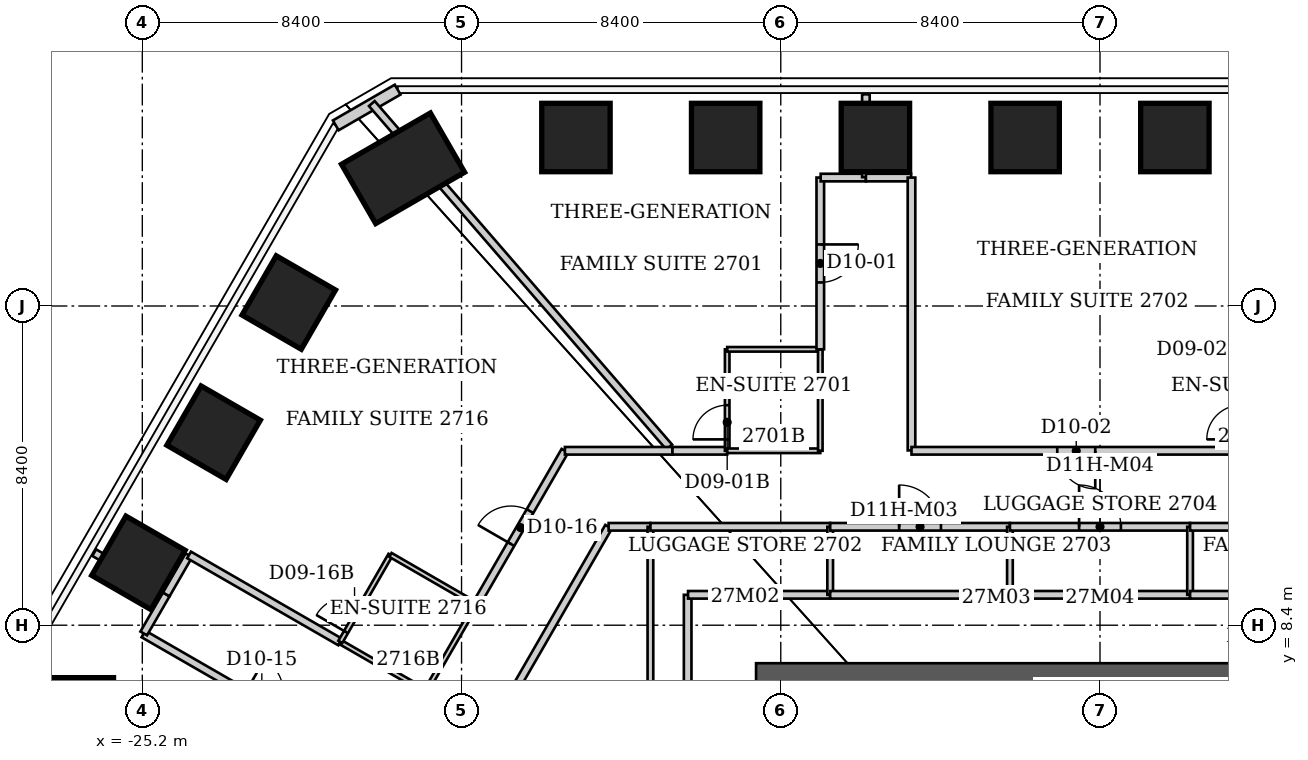
"""IFC4 building model, lengths in metres.
Left out: names, types, materials, properties, quantities, classifications, styles, units other than length and angle.
Written with IfcOpenShell. Run it as: python <this file> out.ifc"""

import sys

from ifc_helpers import new_model, si_unit, direction, frame, frame_2d, origin, origin_2d, place, context, subcontext, project, spatial, rectangle, extrude, element, fill, save


model = new_model("IFC4")
c1 = context("Model", 3, precision=1e-05, world=origin(), true_north=direction((0.0, 1.0)))
c2 = subcontext(c1, "Body", "Model", "MODEL_VIEW")
j1 = project(units=[si_unit("LENGTHUNIT", "METRE"), si_unit("PLANEANGLEUNIT", "RADIAN")], contexts=[c1])
p1 = place(None, origin())
s1 = spatial("IfcSite", under=j1, at=p1, CompositionType="ELEMENT")
p2 = place(p1, origin())
s2 = spatial("IfcBuilding", under=s1, at=p2, CompositionType="ELEMENT")
p3 = place(p2, frame((0.0, 0.0, 112.0)))
s3 = spatial("IfcBuildingStorey", under=s2, at=p3, CompositionType="ELEMENT", Elevation=112.0)
for number, where, z_axis, x_axis in (
    (1, (-13.79, 21.234, 0.0), (0.0, 0.0, 1.0), (0.0, 1.0, 0.0)),
    (2, (-9.85, 21.234, 0.0), (0.0, 0.0, 1.0), (0.0, 1.0, 0.0)),
    (3, (-5.91, 21.234, 0.0), (0.0, 0.0, 1.0), (0.0, 1.0, 0.0)),
    (4, (-1.97, 21.234, 0.0), (0.0, 0.0, 1.0), (0.0, 1.0, 0.0)),
    (5, (1.97, 21.234, 0.0), (0.0, 0.0, 1.0), (0.0, 1.0, 0.0)),
):
    element("IfcColumn", number, at=place(p3, frame(where, z_axis=z_axis, x_axis=x_axis)), inside=s3, PredefinedType="COLUMN", context=c2, shape_type="SweptSolid", body=[
        extrude(rectangle(XDim=1.8, YDim=1.8, at=origin_2d()), origin(), (0.0, 0.0, 1.0), 3.8),
    ])
p4 = place(p3, frame((-26.857, 5.67, 0.0), z_axis=(0.0, 0.0, 1.0), x_axis=(-1.0, 0.0, 0.0)))
e6 = element("IfcColumn", 6, at=p4, inside=s3, PredefinedType="COLUMN", context=c2, shape_type="SweptSolid", body=[
    extrude(rectangle(XDim=1.8, YDim=2.7, at=origin_2d()), origin(), (0.0, 0.0, 1.0), 3.8),
])
for number, where, z_axis, x_axis in (
    (7, (-25.302, 10.041, 0.0), (0.0, 0.0, 1.0), (-0.866, 0.5, 0.0)),
    (8, (-23.324, 13.466, 0.0), (0.0, 0.0, 1.0), (-0.866, 0.5, 0.0)),
    (9, (-21.346, 16.891, 0.0), (0.0, 0.0, 1.0), (-0.866, 0.5, 0.0)),
):
    element("IfcColumn", number, at=place(p3, frame(where, z_axis=z_axis, x_axis=x_axis)), inside=s3, PredefinedType="COLUMN", context=c2, shape_type="SweptSolid", body=[
        extrude(rectangle(XDim=1.8, YDim=1.8, at=origin_2d()), origin(), (0.0, 0.0, 1.0), 3.8),
    ])
p5 = place(p3, frame((-18.339, 20.424, 0.0), z_axis=(0.0, 0.0, 1.0), x_axis=(-0.5, 0.866025403784, 0.0)))
e10 = element("IfcColumn", 10, at=p5, inside=s3, PredefinedType="COLUMN", context=c2, shape_type="SweptSolid", body=[
    extrude(rectangle(XDim=1.8, YDim=2.7, at=origin_2d()), origin(), (0.0, 0.0, 1.0), 3.8),
])
p6 = place(p3, frame((-9.05, 6.75, 0.0), z_axis=(0.0, 0.0, 1.0), x_axis=(1.0, 0.0, 0.0)))
e11 = element("IfcWall", 11, at=p6, inside=s3, PredefinedType="SHEAR", context=c2, shape_type="SweptSolid", body=[
    extrude(rectangle(XDim=18.1, YDim=1.3, at=frame_2d((9.05, 0.0))), origin(), (0.0, 0.0, 1.0), 3.8),
])
p7 = place(p3, frame((-20.11, 21.554, 0.0), z_axis=(0.0, 0.0, 1.0), x_axis=(0.865988793993, 0.500063404658, 0.0)))
e12 = element("IfcWall", 12, at=p7, inside=s3, PredefinedType="SOLIDWALL", context=c2, shape_type="SweptSolid", body=[
    extrude(rectangle(XDim=1.88, YDim=0.3, at=frame_2d((0.94, 0.0))), origin(), (0.0, 0.0, 1.0), 3.64),
])
p8 = place(p3, frame((-26.466, 10.31, 0.0), z_axis=(0.0, 0.0, 1.0), x_axis=(0.865037029405, -0.501708020425, 0.0)))
e13 = element("IfcWall", 13, at=p8, inside=s3, PredefinedType="PARTITIONING", context=c2, shape_type="SweptSolid", body=[
    extrude(rectangle(XDim=2.177, YDim=0.2, at=frame_2d((1.089, 0.0))), origin(), (0.0, 0.0, 1.0), 3.64),
])
p9 = place(p3, frame((-25.17, 8.17, 0.0), z_axis=(0.0, 0.0, 1.0), x_axis=(0.866448885678, -0.499265789443, 0.0)))
e14 = element("IfcWall", 14, at=p9, inside=s3, PredefinedType="PARTITIONING", context=c2, shape_type="SweptSolid", body=[
    extrude(rectangle(XDim=7.19, YDim=0.2, at=frame_2d((3.595, 0.0))), origin(), (0.0, 0.0, 1.0), 3.64),
])
p10 = place(p9, frame((3.095, 0.0, 0.0)))
e15 = element("IfcOpeningElement", 15, at=p10, cuts=e14, PredefinedType="OPENING", context=c2, shape_type="SweptSolid", body=[
    extrude(rectangle(XDim=1.0, YDim=2.13, at=frame_2d((0.5, 1.065))), frame((0.0, 0.1, 0.0), z_axis=(0.0, -1.0, 0.0), x_axis=(1.0, 0.0, 0.0)), (0.0, 0.0, 1.0), 0.2),
])
p11 = place(p3, frame((-25.163, 8.183, 0.0), z_axis=(0.0, 0.0, 1.0), x_axis=(0.499793761865, 0.866144442689, 0.0)))
e16 = element("IfcWall", 16, at=p11, inside=s3, PredefinedType="PARTITIONING", context=c2, shape_type="SweptSolid", body=[
    extrude(rectangle(XDim=1.186, YDim=0.2, at=frame_2d((0.593, 0.0))), origin(), (0.0, 0.0, 1.0), 3.64),
])
p12 = place(p3, frame((-24.57, 9.21, 0.0), z_axis=(0.0, 0.0, 1.0), x_axis=(0.499734288277, 0.866178758179, 0.0)))
e17 = element("IfcWall", 17, at=p12, inside=s3, PredefinedType="PARTITIONING", context=c2, shape_type="SweptSolid", body=[
    extrude(rectangle(XDim=1.191, YDim=0.2, at=frame_2d((0.595, 0.0))), origin(), (0.0, 0.0, 1.0), 3.64),
])
p13 = place(p3, frame((-23.97, 10.25, 0.0), z_axis=(0.0, 0.0, 1.0), x_axis=(0.86645101645, -0.499262091585, 0.0)))
e18 = element("IfcWall", 18, at=p13, inside=s3, PredefinedType="PARTITIONING", context=c2, shape_type="SweptSolid", body=[
    extrude(rectangle(XDim=4.592, YDim=0.2, at=frame_2d((2.296, 0.0))), origin(), (0.0, 0.0, 1.0), 3.64),
])
p14 = place(p3, frame((-19.991, 7.958, 0.0), z_axis=(0.0, 0.0, 1.0), x_axis=(0.866404475641, -0.499342852747, 0.0)))
e19 = element("IfcWall", 19, at=p14, inside=s3, PredefinedType="PARTITIONING", context=c2, shape_type="SweptSolid", body=[
    extrude(rectangle(XDim=2.599, YDim=0.12, at=frame_2d((1.299, 0.0))), origin(), (0.0, 0.0, 1.0), 3.64),
])
p15 = place(p3, frame((-18.67, 10.25, 0.0), z_axis=(0.0, 0.0, 1.0), x_axis=(-0.499407914056, -0.866366975004, 0.0)))
e20 = element("IfcWall", 20, at=p15, inside=s3, PredefinedType="PARTITIONING", context=c2, shape_type="SweptSolid", body=[
    extrude(rectangle(XDim=2.643, YDim=0.12, at=frame_2d((1.322, 0.0))), origin(), (0.0, 0.0, 1.0), 3.64),
])
p16 = place(p15, frame((1.443, 0.0, 0.0)))
e21 = element("IfcOpeningElement", 21, at=p16, cuts=e20, PredefinedType="OPENING", context=c2, shape_type="SweptSolid", body=[
    extrude(rectangle(XDim=0.9, YDim=2.03, at=frame_2d((0.45, 1.015))), frame((0.0, 0.06, 0.0), z_axis=(0.0, -1.0, 0.0), x_axis=(1.0, 0.0, 0.0)), (0.0, 0.0, 1.0), 0.12),
])
p17 = place(p3, frame((-17.74, 6.66, 0.0), z_axis=(0.0, 0.0, 1.0), x_axis=(0.500519174073, 0.865725450929, 0.0)))
e22 = element("IfcWall", 22, at=p17, inside=s3, PredefinedType="PARTITIONING", context=c2, shape_type="SweptSolid", body=[
    extrude(rectangle(XDim=2.643, YDim=0.12, at=frame_2d((1.322, 0.0))), origin(), (0.0, 0.0, 1.0), 3.64),
])
p18 = place(p3, frame((-16.56, 4.7, 0.0), z_axis=(0.0, 0.0, 1.0), x_axis=(0.4998524389, 0.866110581465, 0.0)))
e23 = element("IfcWall", 23, at=p18, inside=s3, PredefinedType="PARTITIONING", context=c2, shape_type="SweptSolid", body=[
    extrude(rectangle(XDim=7.262, YDim=0.2, at=frame_2d((3.631, 0.0))), origin(), (0.0, 0.0, 1.0), 3.64),
])
p19 = place(p3, frame((-16.42, 8.95, 0.0), z_axis=(0.0, 0.0, 1.0), x_axis=(-0.865856933682, 0.500291685314, 0.0)))
e24 = element("IfcWall", 24, at=p19, inside=s3, PredefinedType="PARTITIONING", context=c2, shape_type="SweptSolid", body=[
    extrude(rectangle(XDim=2.599, YDim=0.12, at=frame_2d((1.299, 0.0))), origin(), (0.0, 0.0, 1.0), 3.64),
])
p20 = place(p3, frame((-16.417, 8.948, 0.0), z_axis=(0.0, 0.0, 1.0), x_axis=(0.500547653499, 0.865708984923, 0.0)))
e25 = element("IfcWall", 25, at=p20, inside=s3, PredefinedType="PARTITIONING", context=c2, shape_type="SweptSolid", body=[
    extrude(rectangle(XDim=4.669, YDim=0.2, at=frame_2d((2.334, 0.0))), origin(), (0.0, 0.0, 1.0), 3.64),
])
p21 = place(p20, frame((1.834, 0.0, 0.0)))
e26 = element("IfcOpeningElement", 26, at=p21, cuts=e25, PredefinedType="OPENING", context=c2, shape_type="SweptSolid", body=[
    extrude(rectangle(XDim=1.0, YDim=2.13, at=frame_2d((0.5, 1.065))), frame((0.0, 0.1, 0.0), z_axis=(0.0, -1.0, 0.0), x_axis=(1.0, 0.0, 0.0)), (0.0, 0.0, 1.0), 0.2),
])
p22 = place(p3, frame((-12.93, 10.99, 0.0), z_axis=(0.0, 0.0, 1.0), x_axis=(1.0, 0.0, 0.0)))
e27 = element("IfcWall", 27, at=p22, inside=s3, PredefinedType="PARTITIONING", context=c2, shape_type="SweptSolid", body=[
    extrude(rectangle(XDim=1.1, YDim=0.2, at=frame_2d((0.55, 0.0))), origin(), (0.0, 0.0, 1.0), 3.64),
])
p23 = place(p3, frame((-11.83, 10.99, 0.0), z_axis=(0.0, 0.0, 1.0), x_axis=(0.0, -1.0, 0.0)))
e28 = element("IfcWall", 28, at=p23, inside=s3, PredefinedType="PARTITIONING", context=c2, shape_type="SweptSolid", body=[
    extrude(rectangle(XDim=14.335, YDim=0.15, at=frame_2d((7.167, 0.0))), origin(), (0.0, 0.0, 1.0), 3.64),
])
p24 = place(p3, frame((-11.83, 10.99, 0.0), z_axis=(0.0, 0.0, 1.0), x_axis=(1.0, 0.0, 0.0)))
e29 = element("IfcWall", 29, at=p24, inside=s3, PredefinedType="PARTITIONING", context=c2, shape_type="SweptSolid", body=[
    extrude(rectangle(XDim=4.73, YDim=0.2, at=frame_2d((2.365, 0.0))), origin(), (0.0, 0.0, 1.0), 3.64),
])
p25 = place(p3, frame((-11.335, 13.088, 0.0), z_axis=(0.0, 0.0, 1.0), x_axis=(-0.654526953183, 0.75603866803, 0.0)))
e30 = element("IfcWall", 30, at=p25, inside=s3, PredefinedType="PARTITIONING", context=c2, shape_type="SweptSolid", body=[
    extrude(rectangle(XDim=11.956, YDim=0.2, at=frame_2d((5.978, 0.0))), origin(), (0.0, 0.0, 1.0), 3.64),
])
p26 = place(p3, frame((-11.25, 12.99, 0.0), z_axis=(0.0, 0.0, 1.0), x_axis=(-1.0, 0.0, 0.0)))
e31 = element("IfcWall", 31, at=p26, inside=s3, PredefinedType="PARTITIONING", context=c2, shape_type="SweptSolid", body=[
    extrude(rectangle(XDim=2.83, YDim=0.2, at=frame_2d((1.415, 0.0))), origin(), (0.0, 0.0, 1.0), 3.64),
])
p27 = place(p3, frame((-10.85, 9.2, 0.0), z_axis=(0.0, 0.0, 1.0), x_axis=(0.0, -1.0, 0.0)))
e32 = element("IfcWall", 32, at=p27, inside=s3, PredefinedType="PARTITIONING", context=c2, shape_type="SweptSolid", body=[
    extrude(rectangle(XDim=14.39, YDim=0.2, at=frame_2d((7.195, 0.0))), origin(), (0.0, 0.0, 1.0), 3.64),
])
p28 = place(p27, frame((6.645, 0.0, 0.0)))
e33 = element("IfcOpeningElement", 33, at=p28, cuts=e32, PredefinedType="OPENING", context=c2, shape_type="SweptSolid", body=[
    extrude(rectangle(XDim=1.1, YDim=2.2, at=frame_2d((0.55, 1.1))), frame((0.0, 0.1, 0.0), z_axis=(0.0, -1.0, 0.0), x_axis=(1.0, 0.0, 0.0)), (0.0, 0.0, 1.0), 0.2),
])
p29 = place(p3, frame((-9.81, 12.99, 0.0), z_axis=(0.0, 0.0, 1.0), x_axis=(-1.0, 0.0, 0.0)))
e34 = element("IfcWall", 34, at=p29, inside=s3, PredefinedType="PARTITIONING", context=c2, shape_type="SweptSolid", body=[
    extrude(rectangle(XDim=1.44, YDim=0.2, at=frame_2d((0.72, 0.0))), origin(), (0.0, 0.0, 1.0), 3.64),
])
p30 = place(p3, frame((-9.81, 15.66, 0.0), z_axis=(0.0, 0.0, 1.0), x_axis=(0.0, -1.0, 0.0)))
e35 = element("IfcWall", 35, at=p30, inside=s3, PredefinedType="PARTITIONING", context=c2, shape_type="SweptSolid", body=[
    extrude(rectangle(XDim=2.67, YDim=0.12, at=frame_2d((1.335, 0.0))), origin(), (0.0, 0.0, 1.0), 3.038),
])
p31 = place(p30, frame((1.47, 0.0, 0.0)))
e36 = element("IfcOpeningElement", 36, at=p31, cuts=e35, PredefinedType="OPENING", context=c2, shape_type="SweptSolid", body=[
    extrude(rectangle(XDim=0.9, YDim=2.03, at=frame_2d((0.45, 1.015))), frame((0.0, 0.06, 0.0), z_axis=(0.0, -1.0, 0.0), x_axis=(1.0, 0.0, 0.0)), (0.0, 0.0, 1.0), 0.12),
])
for number, where, z_axis, x_axis in (
    (37, (-7.36, 12.99, 0.0), (0.0, 0.0, 1.0), (-1.0, 0.0, 0.0)),
    (38, (-7.36, 15.66, 0.0), (0.0, 0.0, 1.0), (-1.0, 0.0, 0.0)),
):
    element("IfcWall", number, at=place(p3, frame(where, z_axis=z_axis, x_axis=x_axis)), inside=s3, PredefinedType="PARTITIONING", context=c2, shape_type="SweptSolid", body=[
        extrude(rectangle(XDim=2.45, YDim=0.12, at=frame_2d((1.225, 0.0))), origin(), (0.0, 0.0, 1.0), 3.64),
    ])
p32 = place(p3, frame((-7.36, 15.66, 0.0), z_axis=(0.0, 0.0, 1.0), x_axis=(0.0, -1.0, 0.0)))
e39 = element("IfcWall", 39, at=p32, inside=s3, PredefinedType="PARTITIONING", context=c2, shape_type="SweptSolid", body=[
    extrude(rectangle(XDim=2.67, YDim=0.12, at=frame_2d((1.335, 0.0))), origin(), (0.0, 0.0, 1.0), 3.64),
])
p33 = place(p3, frame((-7.36, 20.18, 0.0), z_axis=(0.0, 0.0, 1.0), x_axis=(0.0, -1.0, 0.0)))
e40 = element("IfcWall", 40, at=p33, inside=s3, PredefinedType="PARTITIONING", context=c2, shape_type="SweptSolid", body=[
    extrude(rectangle(XDim=4.52, YDim=0.2, at=frame_2d((2.26, 0.0))), origin(), (0.0, 0.0, 1.0), 3.64),
])
p34 = place(p33, frame((1.76, 0.0, 0.0)))
e41 = element("IfcOpeningElement", 41, at=p34, cuts=e40, PredefinedType="OPENING", context=c2, shape_type="SweptSolid", body=[
    extrude(rectangle(XDim=1.0, YDim=2.13, at=frame_2d((0.5, 1.065))), frame((0.0, 0.1, 0.0), z_axis=(0.0, -1.0, 0.0), x_axis=(1.0, 0.0, 0.0)), (0.0, 0.0, 1.0), 0.2),
])
p35 = place(p3, frame((-7.1, 9.2, 0.0), z_axis=(0.0, 0.0, 1.0), x_axis=(-1.0, 0.0, 0.0)))
e42 = element("IfcWall", 42, at=p35, inside=s3, PredefinedType="PARTITIONING", context=c2, shape_type="SweptSolid", body=[
    extrude(rectangle(XDim=3.74, YDim=0.2, at=frame_2d((1.87, 0.0))), origin(), (0.0, 0.0, 1.0), 3.64),
])
p36 = place(p3, frame((-7.1, 10.99, 0.0), z_axis=(0.0, 0.0, 1.0), x_axis=(0.0, -1.0, 0.0)))
e43 = element("IfcWall", 43, at=p36, inside=s3, PredefinedType="PARTITIONING", context=c2, shape_type="SweptSolid", body=[
    extrude(rectangle(XDim=1.79, YDim=0.15, at=frame_2d((0.895, 0.0))), origin(), (0.0, 0.0, 1.0), 3.64),
])
p37 = place(p3, frame((-7.1, 10.99, 0.0), z_axis=(0.0, 0.0, 1.0), x_axis=(1.0, 0.0, 0.0)))
e44 = element("IfcWall", 44, at=p37, inside=s3, PredefinedType="PARTITIONING", context=c2, shape_type="SweptSolid", body=[
    extrude(rectangle(XDim=4.73, YDim=0.2, at=frame_2d((2.365, 0.0))), origin(), (0.0, 0.0, 1.0), 3.64),
])
p38 = place(p37, frame((1.815, 0.0, 0.0)))
e45 = element("IfcOpeningElement", 45, at=p38, cuts=e44, PredefinedType="OPENING", context=c2, shape_type="SweptSolid", body=[
    extrude(rectangle(XDim=1.1, YDim=2.2, at=frame_2d((0.55, 1.1))), frame((0.0, 0.1, 0.0), z_axis=(0.0, -1.0, 0.0), x_axis=(1.0, 0.0, 0.0)), (0.0, 0.0, 1.0), 0.2),
])
p39 = place(p3, frame((-6.16, 20.18, 0.0), z_axis=(0.0, 0.0, 1.0), x_axis=(-1.0, 0.0, 0.0)))
e46 = element("IfcWall", 46, at=p39, inside=s3, PredefinedType="PARTITIONING", context=c2, shape_type="SweptSolid", body=[
    extrude(rectangle(XDim=1.19, YDim=0.2, at=frame_2d((0.595, 0.0))), origin(), (0.0, 0.0, 1.0), 3.64),
])
p40 = place(p3, frame((-6.16, 22.37, 0.0), z_axis=(0.0, 0.0, 1.0), x_axis=(0.0, -1.0, 0.0)))
e47 = element("IfcWall", 47, at=p40, inside=s3, PredefinedType="PARTITIONING", context=c2, shape_type="SweptSolid", body=[
    extrude(rectangle(XDim=2.18, YDim=0.2, at=frame_2d((1.09, 0.0))), origin(), (0.0, 0.0, 1.0), 3.64),
])
p41 = place(p3, frame((-4.97, 20.18, 0.0), z_axis=(0.0, 0.0, 1.0), x_axis=(-1.0, 0.0, 0.0)))
e48 = element("IfcWall", 48, at=p41, inside=s3, PredefinedType="PARTITIONING", context=c2, shape_type="SweptSolid", body=[
    extrude(rectangle(XDim=1.19, YDim=0.2, at=frame_2d((0.595, 0.0))), origin(), (0.0, 0.0, 1.0), 3.64),
])
p42 = place(p3, frame((-4.96, 13.0, 0.0), z_axis=(0.0, 0.0, 1.0), x_axis=(0.0, 1.0, 0.0)))
e49 = element("IfcWall", 49, at=p42, inside=s3, PredefinedType="PARTITIONING", context=c2, shape_type="SweptSolid", body=[
    extrude(rectangle(XDim=7.18, YDim=0.2, at=frame_2d((3.59, 0.0))), origin(), (0.0, 0.0, 1.0), 3.64),
])
p43 = place(p3, frame((-2.37, 9.2, 0.0), z_axis=(0.0, 0.0, 1.0), x_axis=(-1.0, 0.0, 0.0)))
e50 = element("IfcWall", 50, at=p43, inside=s3, PredefinedType="PARTITIONING", context=c2, shape_type="SweptSolid", body=[
    extrude(rectangle(XDim=4.73, YDim=0.2, at=frame_2d((2.365, 0.0))), origin(), (0.0, 0.0, 1.0), 3.64),
])
p44 = place(p3, frame((-2.37, 10.99, 0.0), z_axis=(0.0, 0.0, 1.0), x_axis=(0.0, -1.0, 0.0)))
e51 = element("IfcWall", 51, at=p44, inside=s3, PredefinedType="PARTITIONING", context=c2, shape_type="SweptSolid", body=[
    extrude(rectangle(XDim=1.79, YDim=0.15, at=frame_2d((0.895, 0.0))), origin(), (0.0, 0.0, 1.0), 3.64),
])
p45 = place(p3, frame((-2.37, 10.99, 0.0), z_axis=(0.0, 0.0, 1.0), x_axis=(1.0, 0.0, 0.0)))
e52 = element("IfcWall", 52, at=p45, inside=s3, PredefinedType="PARTITIONING", context=c2, shape_type="SweptSolid", body=[
    extrude(rectangle(XDim=4.74, YDim=0.2, at=frame_2d((2.37, 0.0))), origin(), (0.0, 0.0, 1.0), 3.64),
])
p46 = place(p45, frame((1.82, 0.0, 0.0)))
e53 = element("IfcOpeningElement", 53, at=p46, cuts=e52, PredefinedType="OPENING", context=c2, shape_type="SweptSolid", body=[
    extrude(rectangle(XDim=1.1, YDim=2.2, at=frame_2d((0.55, 1.1))), frame((0.0, 0.1, 0.0), z_axis=(0.0, -1.0, 0.0), x_axis=(1.0, 0.0, 0.0)), (0.0, 0.0, 1.0), 0.2),
])
p47 = place(p3, frame((2.37, 9.2, 0.0), z_axis=(0.0, 0.0, 1.0), x_axis=(-1.0, 0.0, 0.0)))
e54 = element("IfcWall", 54, at=p47, inside=s3, PredefinedType="PARTITIONING", context=c2, shape_type="SweptSolid", body=[
    extrude(rectangle(XDim=4.74, YDim=0.2, at=frame_2d((2.37, 0.0))), origin(), (0.0, 0.0, 1.0), 3.64),
])
p48 = place(p3, frame((2.37, 10.99, 0.0), z_axis=(0.0, 0.0, 1.0), x_axis=(0.0, -1.0, 0.0)))
e55 = element("IfcWall", 55, at=p48, inside=s3, PredefinedType="PARTITIONING", context=c2, shape_type="SweptSolid", body=[
    extrude(rectangle(XDim=1.79, YDim=0.15, at=frame_2d((0.895, 0.0))), origin(), (0.0, 0.0, 1.0), 3.64),
])
p49 = place(p3, frame((2.37, 10.99, 0.0), z_axis=(0.0, 0.0, 1.0), x_axis=(1.0, 0.0, 0.0)))
e56 = element("IfcWall", 56, at=p49, inside=s3, PredefinedType="PARTITIONING", context=c2, shape_type="SweptSolid", body=[
    extrude(rectangle(XDim=4.73, YDim=0.2, at=frame_2d((2.365, 0.0))), origin(), (0.0, 0.0, 1.0), 3.64),
])
p50 = place(p49, frame((1.815, 0.0, 0.0)))
e57 = element("IfcOpeningElement", 57, at=p50, cuts=e56, PredefinedType="OPENING", context=c2, shape_type="SweptSolid", body=[
    extrude(rectangle(XDim=1.1, YDim=2.2, at=frame_2d((0.55, 1.1))), frame((0.0, 0.1, 0.0), z_axis=(0.0, -1.0, 0.0), x_axis=(1.0, 0.0, 0.0)), (0.0, 0.0, 1.0), 0.2),
])
p51 = place(p3, frame((3.71, 12.99, 0.0), z_axis=(0.0, 0.0, 1.0), x_axis=(-1.0, 0.0, 0.0)))
e58 = element("IfcWall", 58, at=p51, inside=s3, PredefinedType="PARTITIONING", context=c2, shape_type="SweptSolid", body=[
    extrude(rectangle(XDim=8.67, YDim=0.2, at=frame_2d((4.335, 0.0))), origin(), (0.0, 0.0, 1.0), 3.64),
])
p52 = place(p51, frame((3.835, 0.0, 0.0)))
e59 = element("IfcOpeningElement", 59, at=p52, cuts=e58, PredefinedType="OPENING", context=c2, shape_type="SweptSolid", body=[
    extrude(rectangle(XDim=1.0, YDim=2.13, at=frame_2d((0.5, 1.065))), frame((0.0, 0.1, 0.0), z_axis=(0.0, -1.0, 0.0), x_axis=(1.0, 0.0, 0.0)), (0.0, 0.0, 1.0), 0.2),
])
p53 = place(p3, frame((7.1, 9.2, 0.0), z_axis=(0.0, 0.0, 1.0), x_axis=(-1.0, 0.0, 0.0)))
e60 = element("IfcWall", 60, at=p53, inside=s3, PredefinedType="PARTITIONING", context=c2, shape_type="SweptSolid", body=[
    extrude(rectangle(XDim=4.73, YDim=0.2, at=frame_2d((2.365, 0.0))), origin(), (0.0, 0.0, 1.0), 3.64),
])
p54 = place(p34, origin())
e61 = element("IfcDoor", 61, at=p54, inside=s3, OperationType="SINGLE_SWING_LEFT", PredefinedType="DOOR", context=c2, shape_type="SweptSolid", body=[
    extrude(rectangle(XDim=1.0, YDim=2.13, at=frame_2d((0.5, 1.065))), frame((0.0, 0.025, 0.0), z_axis=(0.0, -1.0, 0.0), x_axis=(1.0, 0.0, 0.0)), (0.0, 0.0, 1.0), 0.05),
])
fill(e41, e61)
p55 = place(p31, origin())
e62 = element("IfcDoor", 62, at=p55, inside=s3, OperationType="SINGLE_SWING_RIGHT", PredefinedType="DOOR", context=c2, shape_type="SweptSolid", body=[
    extrude(rectangle(XDim=0.9, YDim=2.03, at=frame_2d((0.45, 1.015))), frame((0.0, 0.025, 0.0), z_axis=(0.0, -1.0, 0.0), x_axis=(1.0, 0.0, 0.0)), (0.0, 0.0, 1.0), 0.05),
])
fill(e36, e62)
p56 = place(p52, origin())
e63 = element("IfcDoor", 63, at=p56, inside=s3, OperationType="SINGLE_SWING_LEFT", PredefinedType="DOOR", context=c2, shape_type="SweptSolid", body=[
    extrude(rectangle(XDim=1.0, YDim=2.13, at=frame_2d((0.5, 1.065))), frame((0.0, 0.025, 0.0), z_axis=(0.0, -1.0, 0.0), x_axis=(1.0, 0.0, 0.0)), (0.0, 0.0, 1.0), 0.05),
])
fill(e59, e63)
p57 = place(p21, origin())
e64 = element("IfcDoor", 64, at=p57, inside=s3, OperationType="SINGLE_SWING_LEFT", PredefinedType="DOOR", context=c2, shape_type="SweptSolid", body=[
    extrude(rectangle(XDim=1.0, YDim=2.13, at=frame_2d((0.5, 1.065))), frame((0.0, 0.025, 0.0), z_axis=(0.0, -1.0, 0.0), x_axis=(1.0, 0.0, 0.0)), (0.0, 0.0, 1.0), 0.05),
])
fill(e26, e64)
p58 = place(p16, origin())
e65 = element("IfcDoor", 65, at=p58, inside=s3, OperationType="SINGLE_SWING_RIGHT", PredefinedType="DOOR", context=c2, shape_type="SweptSolid", body=[
    extrude(rectangle(XDim=0.9, YDim=2.03, at=frame_2d((0.45, 1.015))), frame((0.0, 0.025, 0.0), z_axis=(0.0, -1.0, 0.0), x_axis=(1.0, 0.0, 0.0)), (0.0, 0.0, 1.0), 0.05),
])
fill(e21, e65)
p59 = place(p38, origin())
e66 = element("IfcDoor", 66, at=p59, inside=s3, OperationType="SINGLE_SWING_LEFT", PredefinedType="DOOR", context=c2, shape_type="SweptSolid", body=[
    extrude(rectangle(XDim=1.1, YDim=2.2, at=frame_2d((0.55, 1.1))), frame((0.0, 0.025, 0.0), z_axis=(0.0, -1.0, 0.0), x_axis=(1.0, 0.0, 0.0)), (0.0, 0.0, 1.0), 0.05),
])
fill(e45, e66)
p60 = place(p46, origin())
e67 = element("IfcDoor", 67, at=p60, inside=s3, OperationType="SINGLE_SWING_LEFT", PredefinedType="DOOR", context=c2, shape_type="SweptSolid", body=[
    extrude(rectangle(XDim=1.1, YDim=2.2, at=frame_2d((0.55, 1.1))), frame((0.0, 0.025, 0.0), z_axis=(0.0, -1.0, 0.0), x_axis=(1.0, 0.0, 0.0)), (0.0, 0.0, 1.0), 0.05),
])
fill(e53, e67)
save(model, sys.argv[1])
